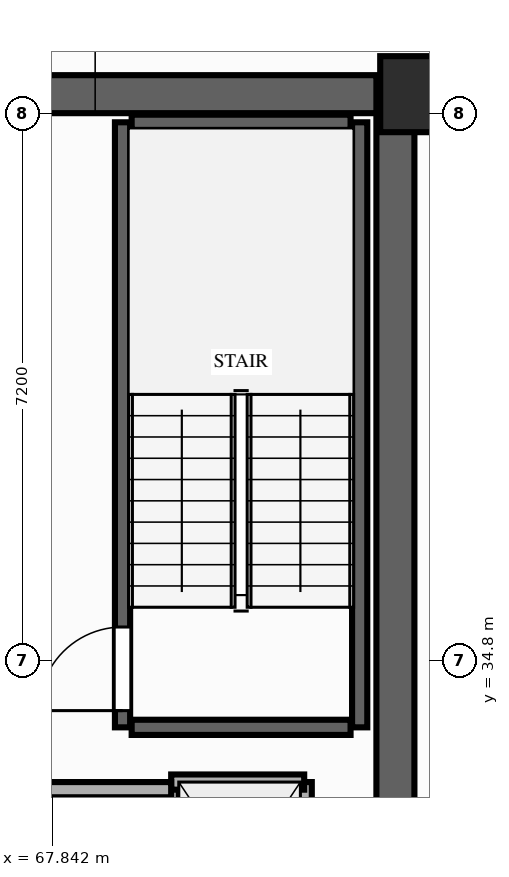
"""IFC4 building model, lengths in metres.
Left out: names, types, materials, properties, quantities, classifications, styles, units other than length and angle.
Written with IfcOpenShell. Run it as: python <this file> out.ifc"""

import sys

from ifc_helpers import new_model, si_unit, direction, frame, frame_2d, origin, origin_2d, place, context, subcontext, project, spatial, rectangle, extrude, element, fill, save


model = new_model("IFC4")
c1 = context("Model", 3, precision=1e-05, world=origin(), true_north=direction((0.0, 1.0)))
c2 = subcontext(c1, "Body", "Model", "MODEL_VIEW")
j1 = project(units=[si_unit("LENGTHUNIT", "METRE"), si_unit("PLANEANGLEUNIT", "RADIAN")], contexts=[c1])
p1 = place(None, origin())
s1 = spatial("IfcSite", under=j1, at=p1, CompositionType="ELEMENT")
p2 = place(p1, origin())
s2 = spatial("IfcBuilding", under=s1, at=p2, CompositionType="ELEMENT")
p3 = place(p2, frame((0.0, 0.0, 39.8)))
s3 = spatial("IfcBuildingStorey", under=s2, at=p3, CompositionType="ELEMENT", Elevation=39.8)
p4 = place(p3, frame((72.65, 42.25, 0.0), z_axis=(0.0, 0.0, 1.0), x_axis=(1.0, 0.0, 0.0)))
e1 = element("IfcColumn", 1, at=p4, inside=s3, PredefinedType="COLUMN", context=c2, shape_type="SweptSolid", body=[
    extrude(rectangle(XDim=1.0, YDim=1.0, at=origin_2d()), origin(), (0.0, 0.0, 1.0), 3.8),
])
p5 = place(p3, frame((72.35, 22.0, 0.0), z_axis=(0.0, 0.0, 1.0), x_axis=(0.0, 1.0, 0.0)))
e2 = element("IfcWall", 2, at=p5, inside=s3, PredefinedType="SHEAR", context=c2, shape_type="SweptSolid", body=[
    extrude(rectangle(XDim=20.25, YDim=0.5, at=frame_2d((10.125, 0.0))), origin(), (0.0, 0.0, 1.0), 3.62),
])
p6 = place(p3, frame((64.6, 42.25, 0.0), z_axis=(0.0, 0.0, 1.0), x_axis=(1.0, 0.0, 0.0)))
e3 = element("IfcWall", 3, at=p6, inside=s3, PredefinedType="SHEAR", context=c2, shape_type="SweptSolid", body=[
    extrude(rectangle(XDim=7.5, YDim=0.5, at=frame_2d((3.75, 0.0))), origin(), (0.0, 0.0, 1.0), 3.62),
])
p7 = place(p3, frame((68.76, 33.92, 0.0), z_axis=(0.0, 0.0, 1.0), x_axis=(0.0, 1.0, 0.0)))
e4 = element("IfcWall", 4, at=p7, inside=s3, PredefinedType="SHEAR", context=c2, shape_type="SweptSolid", body=[
    extrude(rectangle(XDim=7.96, YDim=0.2, at=frame_2d((3.98, 0.0))), origin(), (0.0, 0.0, 1.0), 3.62),
])
p8 = place(p7, frame((0.22, 0.0, 0.0)))
e5 = element("IfcOpeningElement", 5, at=p8, cuts=e4, PredefinedType="OPENING", context=c2, shape_type="SweptSolid", body=[
    extrude(rectangle(XDim=1.1, YDim=2.15, at=frame_2d((0.55, 1.075))), frame((0.0, 0.11, 0.0), z_axis=(0.0, -1.0, 0.0), x_axis=(1.0, 0.0, 0.0)), (0.0, 0.0, 1.0), 0.22),
])
p9 = place(p3, frame((71.88, 33.92, 0.0), z_axis=(0.0, 0.0, 1.0), x_axis=(0.0, 1.0, 0.0)))
e6 = element("IfcWall", 6, at=p9, inside=s3, PredefinedType="SHEAR", context=c2, shape_type="SweptSolid", body=[
    extrude(rectangle(XDim=7.96, YDim=0.2, at=frame_2d((3.98, 0.0))), origin(), (0.0, 0.0, 1.0), 3.62),
])
for number, where, z_axis, x_axis in (
    (7, (68.88, 41.88, 0.0), (0.0, 0.0, 1.0), (1.0, 0.0, 0.0)),
    (8, (68.88, 33.92, 0.0), (0.0, 0.0, 1.0), (1.0, 0.0, 0.0)),
):
    element("IfcWall", number, at=place(p3, frame(where, z_axis=z_axis, x_axis=x_axis)), inside=s3, PredefinedType="SHEAR", context=c2, shape_type="SweptSolid", body=[
        extrude(rectangle(XDim=2.88, YDim=0.2, at=frame_2d((1.44, 0.0))), origin(), (0.0, 0.0, 1.0), 3.62),
    ])
p10 = place(p3, frame((69.4, 30.75, 0.0), z_axis=(0.0, 0.0, 1.0), x_axis=(0.0, 1.0, 0.0)))
e9 = element("IfcWall", 9, at=p10, inside=s3, PredefinedType="MOVABLE", context=c2, shape_type="SweptSolid", body=[
    extrude(rectangle(XDim=2.45, YDim=0.2, at=frame_2d((1.225, 0.0))), origin(), (0.0, 0.0, 1.0), 3.62),
])
p11 = place(p10, frame((0.65, 0.0, 0.0)))
e10 = element("IfcOpeningElement", 10, at=p11, cuts=e9, PredefinedType="OPENING", context=c2, shape_type="SweptSolid", body=[
    extrude(rectangle(XDim=1.05, YDim=2.15, at=frame_2d((0.525, 1.075))), frame((0.0, 0.11, 0.0), z_axis=(0.0, -1.0, 0.0), x_axis=(1.0, 0.0, 0.0)), (0.0, 0.0, 1.0), 0.22),
])
p12 = place(p3, frame((71.15, 30.75, 0.0), z_axis=(0.0, 0.0, 1.0), x_axis=(0.0, 1.0, 0.0)))
e11 = element("IfcWall", 11, at=p12, inside=s3, PredefinedType="MOVABLE", context=c2, shape_type="SweptSolid", body=[
    extrude(rectangle(XDim=2.45, YDim=0.2, at=frame_2d((1.225, 0.0))), origin(), (0.0, 0.0, 1.0), 3.62),
])
p13 = place(p3, frame((69.4, 33.2, 0.0), z_axis=(0.0, 0.0, 1.0), x_axis=(1.0, 0.0, 0.0)))
e12 = element("IfcWall", 12, at=p13, inside=s3, PredefinedType="MOVABLE", context=c2, shape_type="SweptSolid", body=[
    extrude(rectangle(XDim=1.75, YDim=0.2, at=frame_2d((0.875, 0.0))), origin(), (0.0, 0.0, 1.0), 3.62),
])
p14 = place(p3, frame((65.8, 33.1, 0.0), z_axis=(0.0, 0.0, 1.0), x_axis=(1.0, 0.0, 0.0)))
e13 = element("IfcWall", 13, at=p14, inside=s3, PredefinedType="PARTITIONING", context=c2, shape_type="SweptSolid", body=[
    extrude(rectangle(XDim=3.6, YDim=0.2, at=frame_2d((1.8, 0.0))), origin(), (0.0, 0.0, 1.0), 3.62),
])
p15 = place(p8, origin())
e14 = element("IfcDoor", 14, at=p15, inside=s3, OperationType="SINGLE_SWING_LEFT", PredefinedType="DOOR", context=c2, shape_type="SweptSolid", body=[
    extrude(rectangle(XDim=1.1, YDim=2.15, at=frame_2d((0.55, 1.075))), frame((0.0, 0.025, 0.0), z_axis=(0.0, -1.0, 0.0), x_axis=(1.0, 0.0, 0.0)), (0.0, 0.0, 1.0), 0.05),
])
fill(e5, e14)
save(model, sys.argv[1])
